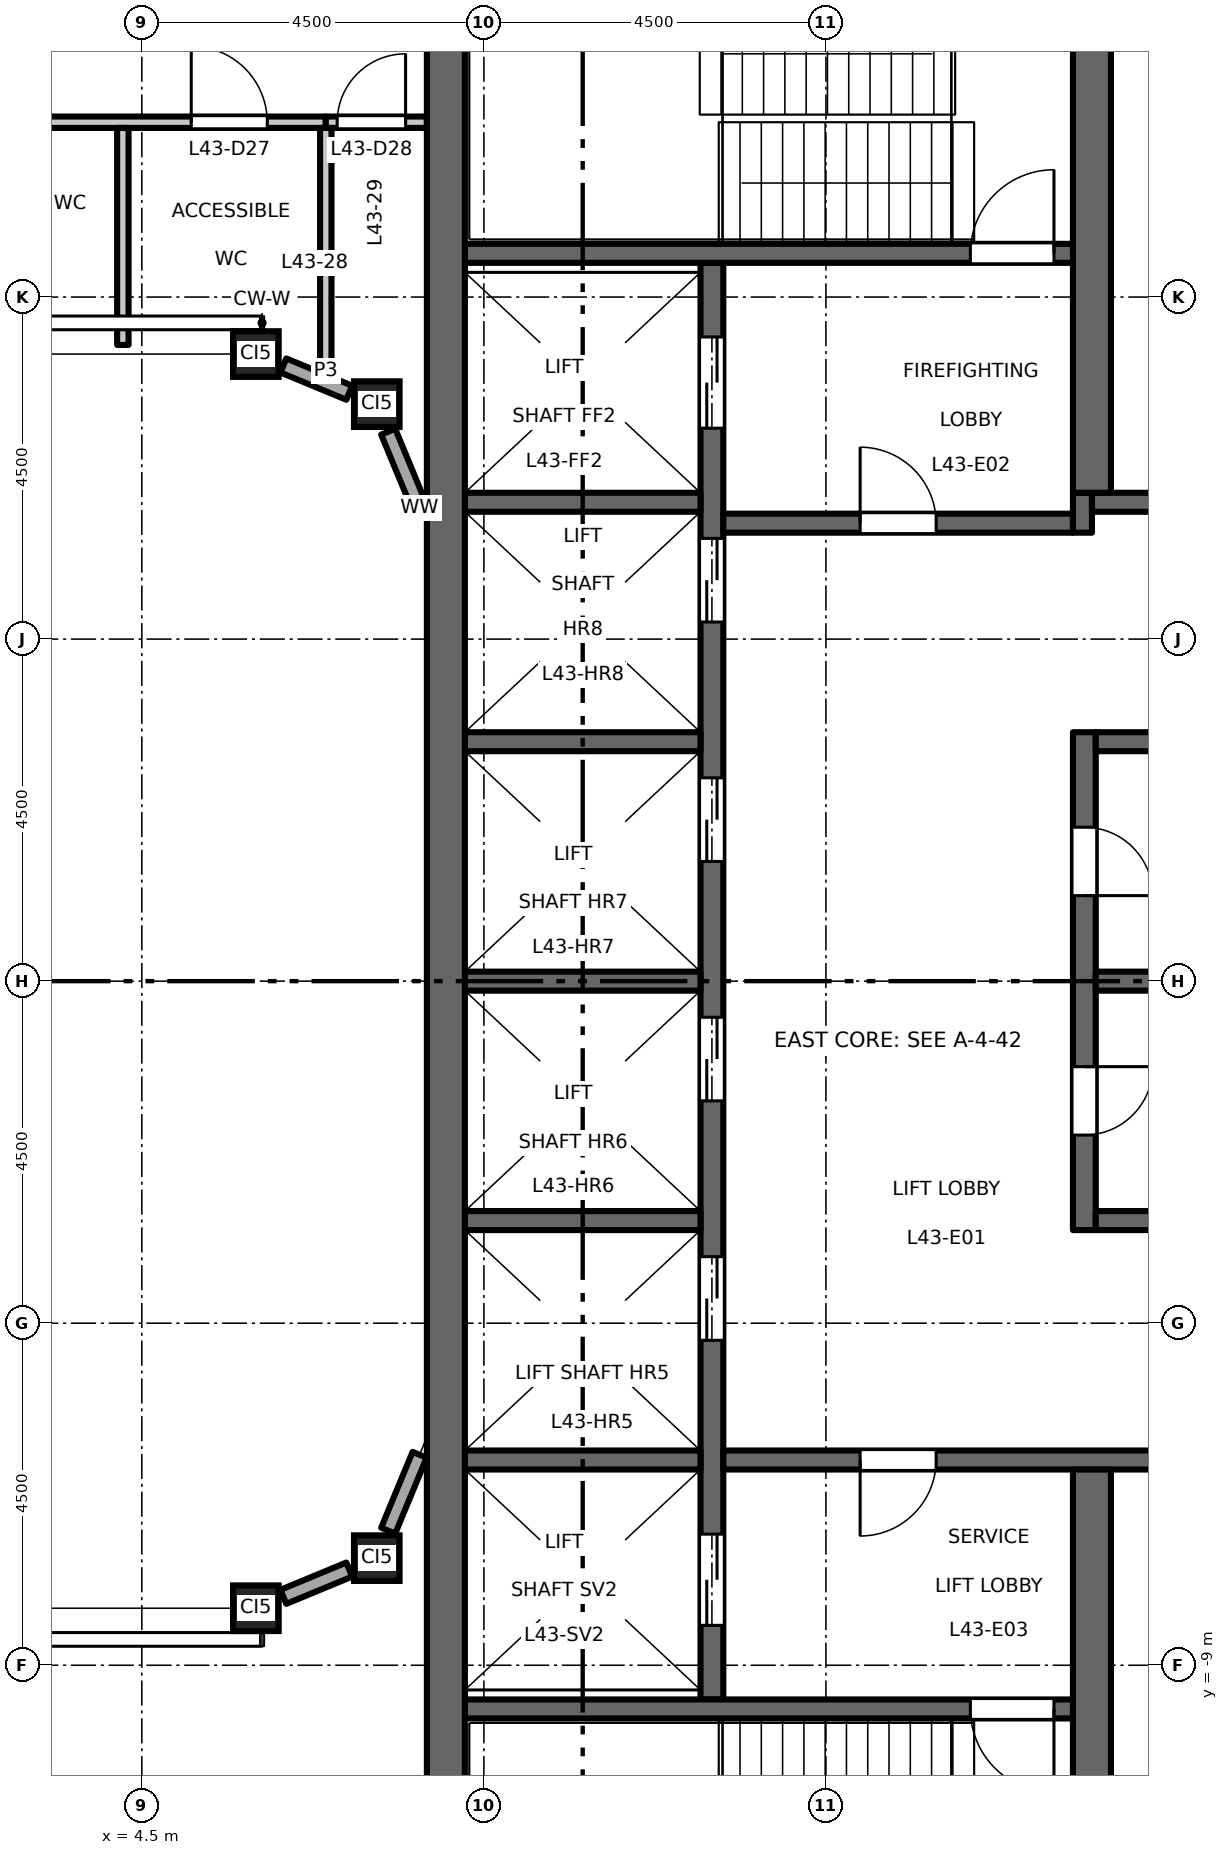
"""IFC4 building model, lengths in metres.
Left out: names, types, materials, properties, quantities, classifications, styles, units other than length and angle.
Written with IfcOpenShell. Run it as: python <this file> out.ifc"""

import sys

from ifc_helpers import new_model, si_unit, direction, frame, frame_2d, origin, origin_2d, place, context, subcontext, project, spatial, rectangle, hollow_rectangle, extrude, element, fill, save


model = new_model("IFC4")
c1 = context("Model", 3, precision=1e-05, world=origin(), true_north=direction((0.0, 1.0)))
c2 = subcontext(c1, "Body", "Model", "MODEL_VIEW")
j1 = project(units=[si_unit("LENGTHUNIT", "METRE"), si_unit("PLANEANGLEUNIT", "RADIAN")], contexts=[c1])
p1 = place(None, origin())
s1 = spatial("IfcSite", under=j1, at=p1, CompositionType="ELEMENT")
p2 = place(p1, origin())
s2 = spatial("IfcBuilding", under=s1, at=p2, CompositionType="ELEMENT")
p3 = place(p2, frame((0.0, 0.0, 201.7)))
s3 = spatial("IfcBuildingStorey", under=s2, at=p3, CompositionType="ELEMENT", Elevation=201.7)
for number, where, z_axis, x_axis in (
    (1, (6.0, -8.25, 0.0), (0.0, 0.0, 1.0), (1.0, 0.0, 0.0)),
    (2, (7.591, -7.591, 0.0), (0.0, 0.0, 1.0), (1.0, 0.0, 0.0)),
    (3, (6.0, 8.25, 0.0), (0.0, 0.0, 1.0), (1.0, 0.0, 0.0)),
    (4, (7.591, 7.591, 0.0), (0.0, 0.0, 1.0), (1.0, 0.0, 0.0)),
):
    element("IfcColumn", number, at=place(p3, frame(where, z_axis=z_axis, x_axis=x_axis)), inside=s3, PredefinedType="COLUMN", context=c2, shape_type="SweptSolid", body=[
        extrude(hollow_rectangle(XDim=0.6, YDim=0.6, WallThickness=0.032, at=origin_2d()), origin(), (0.0, 0.0, 1.0), 4.5),
    ])
p4 = place(p3, frame((12.0, -9.45, 0.0), z_axis=(0.0, 0.0, 1.0), x_axis=(0.0, 1.0, 0.0)))
e5 = element("IfcWall", 5, at=p4, inside=s3, PredefinedType="SHEAR", context=c2, shape_type="SweptSolid", body=[
    extrude(rectangle(XDim=18.9, YDim=0.3, at=frame_2d((9.45, 0.0))), origin(), (0.0, 0.0, 1.0), 4.35),
])
p5 = place(p4, frame((4.725, 0.0, 0.0)))
e6 = element("IfcOpeningElement", 6, at=p5, cuts=e5, PredefinedType="OPENING", context=c2, shape_type="SweptSolid", body=[
    extrude(rectangle(XDim=1.1, YDim=2.1, at=frame_2d((0.55, 1.05))), frame((0.0, 0.16, 0.0), z_axis=(0.0, -1.0, 0.0), x_axis=(1.0, 0.0, 0.0)), (0.0, 0.0, 1.0), 0.32),
])
p6 = place(p4, frame((7.875, 0.0, 0.0)))
e7 = element("IfcOpeningElement", 7, at=p6, cuts=e5, PredefinedType="OPENING", context=c2, shape_type="SweptSolid", body=[
    extrude(rectangle(XDim=1.1, YDim=2.1, at=frame_2d((0.55, 1.05))), frame((0.0, 0.16, 0.0), z_axis=(0.0, -1.0, 0.0), x_axis=(1.0, 0.0, 0.0)), (0.0, 0.0, 1.0), 0.32),
])
p7 = place(p4, frame((11.025, 0.0, 0.0)))
e8 = element("IfcOpeningElement", 8, at=p7, cuts=e5, PredefinedType="OPENING", context=c2, shape_type="SweptSolid", body=[
    extrude(rectangle(XDim=1.1, YDim=2.1, at=frame_2d((0.55, 1.05))), frame((0.0, 0.16, 0.0), z_axis=(0.0, -1.0, 0.0), x_axis=(1.0, 0.0, 0.0)), (0.0, 0.0, 1.0), 0.32),
])
p8 = place(p4, frame((14.175, 0.0, 0.0)))
e9 = element("IfcOpeningElement", 9, at=p8, cuts=e5, PredefinedType="OPENING", context=c2, shape_type="SweptSolid", body=[
    extrude(rectangle(XDim=1.1, YDim=2.1, at=frame_2d((0.55, 1.05))), frame((0.0, 0.16, 0.0), z_axis=(0.0, -1.0, 0.0), x_axis=(1.0, 0.0, 0.0)), (0.0, 0.0, 1.0), 0.32),
])
p9 = place(p4, frame((16.725, 0.0, 0.0)))
e10 = element("IfcOpeningElement", 10, at=p9, cuts=e5, PredefinedType="OPENING", context=c2, shape_type="SweptSolid", body=[
    extrude(rectangle(XDim=1.2, YDim=2.1, at=frame_2d((0.6, 1.05))), frame((0.0, 0.16, 0.0), z_axis=(0.0, -1.0, 0.0), x_axis=(1.0, 0.0, 0.0)), (0.0, 0.0, 1.0), 0.32),
])
p10 = place(p4, frame((0.975, 0.0, 0.0)))
e11 = element("IfcOpeningElement", 11, at=p10, cuts=e5, PredefinedType="OPENING", context=c2, shape_type="SweptSolid", body=[
    extrude(rectangle(XDim=1.2, YDim=2.1, at=frame_2d((0.6, 1.05))), frame((0.0, 0.16, 0.0), z_axis=(0.0, -1.0, 0.0), x_axis=(1.0, 0.0, 0.0)), (0.0, 0.0, 1.0), 0.32),
])
p11 = place(p3, frame((12.15, 6.025, 0.0), z_axis=(0.0, 0.0, 1.0), x_axis=(1.0, 0.0, 0.0)))
e12 = element("IfcWall", 12, at=p11, inside=s3, PredefinedType="SHEAR", context=c2, shape_type="SweptSolid", body=[
    extrude(rectangle(XDim=4.6, YDim=0.25, at=frame_2d((2.3, 0.0))), origin(), (0.0, 0.0, 1.0), 4.35),
])
p12 = place(p11, frame((1.8, 0.0, 0.0)))
e13 = element("IfcOpeningElement", 13, at=p12, cuts=e12, PredefinedType="OPENING", context=c2, shape_type="SweptSolid", body=[
    extrude(rectangle(XDim=1.0, YDim=2.1, at=frame_2d((0.5, 1.05))), frame((0.0, 0.135, 0.0), z_axis=(0.0, -1.0, 0.0), x_axis=(1.0, 0.0, 0.0)), (0.0, 0.0, 1.0), 0.27),
])
p13 = place(p3, frame((16.875, 5.9, 0.0), z_axis=(0.0, 0.0, 1.0), x_axis=(0.0, 1.0, 0.0)))
e14 = element("IfcWall", 14, at=p13, inside=s3, PredefinedType="SHEAR", context=c2, shape_type="SweptSolid", body=[
    extrude(rectangle(XDim=0.525, YDim=0.25, at=frame_2d((0.263, 0.0))), origin(), (0.0, 0.0, 1.0), 4.35),
])
p14 = place(p3, frame((17.0, 6.3, 0.0), z_axis=(0.0, 0.0, 1.0), x_axis=(1.0, 0.0, 0.0)))
e15 = element("IfcWall", 15, at=p14, inside=s3, PredefinedType="SHEAR", context=c2, shape_type="SweptSolid", body=[
    extrude(rectangle(XDim=4.25, YDim=0.25, at=frame_2d((2.125, 0.0))), origin(), (0.0, 0.0, 1.0), 4.35),
])
p15 = place(p3, frame((12.15, -6.3, 0.0), z_axis=(0.0, 0.0, 1.0), x_axis=(1.0, 0.0, 0.0)))
e16 = element("IfcWall", 16, at=p15, inside=s3, PredefinedType="SHEAR", context=c2, shape_type="SweptSolid", body=[
    extrude(rectangle(XDim=9.1, YDim=0.25, at=frame_2d((4.55, 0.0))), origin(), (0.0, 0.0, 1.0), 4.35),
])
p16 = place(p15, frame((1.8, 0.0, 0.0)))
e17 = element("IfcOpeningElement", 17, at=p16, cuts=e16, PredefinedType="OPENING", context=c2, shape_type="SweptSolid", body=[
    extrude(rectangle(XDim=1.0, YDim=2.1, at=frame_2d((0.5, 1.05))), frame((0.0, 0.135, 0.0), z_axis=(0.0, -1.0, 0.0), x_axis=(1.0, 0.0, 0.0)), (0.0, 0.0, 1.0), 0.27),
])
p17 = place(p3, frame((16.9, -3.275, 0.0), z_axis=(0.0, 0.0, 1.0), x_axis=(0.0, 1.0, 0.0)))
e18 = element("IfcWall", 18, at=p17, inside=s3, PredefinedType="SHEAR", context=c2, shape_type="SweptSolid", body=[
    extrude(rectangle(XDim=6.55, YDim=0.3, at=frame_2d((3.275, 0.0))), origin(), (0.0, 0.0, 1.0), 4.35),
])
p18 = place(p17, frame((1.25, 0.0, 0.0)))
e19 = element("IfcOpeningElement", 19, at=p18, cuts=e18, PredefinedType="OPENING", context=c2, shape_type="SweptSolid", body=[
    extrude(rectangle(XDim=0.9, YDim=2.1, at=frame_2d((0.45, 1.05))), frame((0.0, 0.16, 0.0), z_axis=(0.0, -1.0, 0.0), x_axis=(1.0, 0.0, 0.0)), (0.0, 0.0, 1.0), 0.32),
])
p19 = place(p17, frame((4.4, 0.0, 0.0)))
e20 = element("IfcOpeningElement", 20, at=p19, cuts=e18, PredefinedType="OPENING", context=c2, shape_type="SweptSolid", body=[
    extrude(rectangle(XDim=0.9, YDim=2.1, at=frame_2d((0.45, 1.05))), frame((0.0, 0.16, 0.0), z_axis=(0.0, -1.0, 0.0), x_axis=(1.0, 0.0, 0.0)), (0.0, 0.0, 1.0), 0.32),
])
for number, where, z_axis, x_axis in (
    (21, (17.05, 0.0, 0.0), (0.0, 0.0, 1.0), (1.0, 0.0, 0.0)),
    (22, (17.05, 3.15, 0.0), (0.0, 0.0, 1.0), (1.0, 0.0, 0.0)),
    (23, (17.05, -3.15, 0.0), (0.0, 0.0, 1.0), (1.0, 0.0, 0.0)),
):
    element("IfcWall", number, at=place(p3, frame(where, z_axis=z_axis, x_axis=x_axis)), inside=s3, PredefinedType="SHEAR", context=c2, shape_type="SweptSolid", body=[
        extrude(rectangle(XDim=4.2, YDim=0.25, at=frame_2d((2.1, 0.0))), origin(), (0.0, 0.0, 1.0), 4.35),
    ])
for number, where, z_axis, x_axis in (
    (24, (17.0, 6.425, 0.0), (0.0, 0.0, 1.0), (0.0, 1.0, 0.0)),
    (25, (17.0, -13.0, 0.0), (0.0, 0.0, 1.0), (0.0, 1.0, 0.0)),
):
    element("IfcWall", number, at=place(p3, frame(where, z_axis=z_axis, x_axis=x_axis)), inside=s3, PredefinedType="SHEAR", context=c2, shape_type="SweptSolid", body=[
        extrude(rectangle(XDim=6.575, YDim=0.5, at=frame_2d((3.288, 0.0))), origin(), (0.0, 0.0, 1.0), 4.35),
    ])
for number, where, z_axis, x_axis in (
    (26, (8.75, 0.0, 0.0), (0.0, 0.0, 1.0), (1.0, 0.0, 0.0)),
    (27, (8.75, 3.15, 0.0), (0.0, 0.0, 1.0), (1.0, 0.0, 0.0)),
    (28, (8.75, 6.3, 0.0), (0.0, 0.0, 1.0), (1.0, 0.0, 0.0)),
    (29, (8.75, -3.15, 0.0), (0.0, 0.0, 1.0), (1.0, 0.0, 0.0)),
    (30, (8.75, -6.3, 0.0), (0.0, 0.0, 1.0), (1.0, 0.0, 0.0)),
):
    element("IfcWall", number, at=place(p3, frame(where, z_axis=z_axis, x_axis=x_axis)), inside=s3, PredefinedType="SHEAR", context=c2, shape_type="SweptSolid", body=[
        extrude(rectangle(XDim=3.1, YDim=0.25, at=frame_2d((1.55, 0.0))), origin(), (0.0, 0.0, 1.0), 4.35),
    ])
p20 = place(p3, frame((8.75, 9.575, 0.0), z_axis=(0.0, 0.0, 1.0), x_axis=(1.0, 0.0, 0.0)))
e31 = element("IfcWall", 31, at=p20, inside=s3, PredefinedType="SHEAR", context=c2, shape_type="SweptSolid", body=[
    extrude(rectangle(XDim=8.0, YDim=0.25, at=frame_2d((4.0, 0.0))), origin(), (0.0, 0.0, 1.0), 4.35),
])
p21 = place(p20, frame((6.65, 0.0, 0.0)))
e32 = element("IfcOpeningElement", 32, at=p21, cuts=e31, PredefinedType="OPENING", context=c2, shape_type="SweptSolid", body=[
    extrude(rectangle(XDim=1.1, YDim=2.1, at=frame_2d((0.55, 1.05))), frame((0.0, 0.135, 0.0), z_axis=(0.0, -1.0, 0.0), x_axis=(1.0, 0.0, 0.0)), (0.0, 0.0, 1.0), 0.27),
])
p22 = place(p3, frame((8.75, -9.575, 0.0), z_axis=(0.0, 0.0, 1.0), x_axis=(1.0, 0.0, 0.0)))
e33 = element("IfcWall", 33, at=p22, inside=s3, PredefinedType="SHEAR", context=c2, shape_type="SweptSolid", body=[
    extrude(rectangle(XDim=8.0, YDim=0.25, at=frame_2d((4.0, 0.0))), origin(), (0.0, 0.0, 1.0), 4.35),
])
p23 = place(p22, frame((6.65, 0.0, 0.0)))
e34 = element("IfcOpeningElement", 34, at=p23, cuts=e33, PredefinedType="OPENING", context=c2, shape_type="SweptSolid", body=[
    extrude(rectangle(XDim=1.1, YDim=2.1, at=frame_2d((0.55, 1.05))), frame((0.0, 0.135, 0.0), z_axis=(0.0, -1.0, 0.0), x_axis=(1.0, 0.0, 0.0)), (0.0, 0.0, 1.0), 0.27),
])
p24 = place(p3, frame((8.5, -13.0, 0.0), z_axis=(0.0, 0.0, 1.0), x_axis=(0.0, 1.0, 0.0)))
e35 = element("IfcWall", 35, at=p24, inside=s3, PredefinedType="SHEAR", context=c2, shape_type="SweptSolid", body=[
    extrude(rectangle(XDim=26.0, YDim=0.5, at=frame_2d((13.0, 0.0))), origin(), (0.0, 0.0, 1.0), 4.35),
])
p25 = place(p3, frame((6.362, -8.1, 0.0), z_axis=(0.0, 0.0, 1.0), x_axis=(0.923829670615, 0.382803787458, 0.0)))
e36 = element("IfcWall", 36, at=p25, inside=s3, PredefinedType="STANDARD", context=c2, shape_type="SweptSolid", body=[
    extrude(rectangle(XDim=0.938, YDim=0.2, at=frame_2d((0.469, 0.0))), origin(), (0.0, 0.0, 1.0), 3.918),
])
for number, where, z_axis, x_axis in (
    (37, (7.741, -7.229, 0.0), (0.0, 0.0, 1.0), (0.383, 0.924, 0.0)),
    (38, (8.154, 6.231, 0.0), (0.0, 0.0, 1.0), (-0.383, 0.924, 0.0)),
):
    element("IfcWall", number, at=place(p3, frame(where, z_axis=z_axis, x_axis=x_axis)), inside=s3, PredefinedType="STANDARD", context=c2, shape_type="SweptSolid", body=[
        extrude(rectangle(XDim=1.08, YDim=0.2, at=frame_2d((0.54, 0.0))), origin(), (0.0, 0.0, 1.0), 3.918),
    ])
p26 = place(p3, frame((7.229, 7.741, 0.0), z_axis=(0.0, 0.0, 1.0), x_axis=(-0.923829670615, 0.382803787458, 0.0)))
e39 = element("IfcWall", 39, at=p26, inside=s3, PredefinedType="STANDARD", context=c2, shape_type="SweptSolid", body=[
    extrude(rectangle(XDim=0.938, YDim=0.2, at=frame_2d((0.469, 0.0))), origin(), (0.0, 0.0, 1.0), 3.918),
])
p27 = place(p3, frame((-8.25, 11.3, 0.0), z_axis=(0.0, 0.0, 1.0), x_axis=(1.0, 0.0, 0.0)))
e40 = element("IfcWall", 40, at=p27, inside=s3, PredefinedType="PARTITIONING", context=c2, shape_type="SweptSolid", body=[
    extrude(rectangle(XDim=15.17, YDim=0.15, at=frame_2d((7.585, 0.0))), origin(), (0.0, 0.0, 1.0), 4.35),
])
p28 = place(p27, frame((2.65, 0.0, 0.0)))
e41 = element("IfcOpeningElement", 41, at=p28, cuts=e40, PredefinedType="OPENING", context=c2, shape_type="SweptSolid", body=[
    extrude(rectangle(XDim=1.0, YDim=2.1, at=frame_2d((0.5, 1.05))), frame((0.0, 0.085, 0.0), z_axis=(0.0, -1.0, 0.0), x_axis=(1.0, 0.0, 0.0)), (0.0, 0.0, 1.0), 0.17),
])
p29 = place(p27, frame((8.9, 0.0, 0.0)))
e42 = element("IfcOpeningElement", 42, at=p29, cuts=e40, PredefinedType="OPENING", context=c2, shape_type="SweptSolid", body=[
    extrude(rectangle(XDim=1.0, YDim=2.1, at=frame_2d((0.5, 1.05))), frame((0.0, 0.085, 0.0), z_axis=(0.0, -1.0, 0.0), x_axis=(1.0, 0.0, 0.0)), (0.0, 0.0, 1.0), 0.17),
])
p30 = place(p27, frame((13.4, 0.0, 0.0)))
e43 = element("IfcOpeningElement", 43, at=p30, cuts=e40, PredefinedType="OPENING", context=c2, shape_type="SweptSolid", body=[
    extrude(rectangle(XDim=1.0, YDim=2.1, at=frame_2d((0.5, 1.05))), frame((0.0, 0.085, 0.0), z_axis=(0.0, -1.0, 0.0), x_axis=(1.0, 0.0, 0.0)), (0.0, 0.0, 1.0), 0.17),
])
p31 = place(p3, frame((6.92, 11.3, 0.0), z_axis=(0.0, 0.0, 1.0), x_axis=(1.0, 0.0, 0.0)))
e44 = element("IfcWall", 44, at=p31, inside=s3, PredefinedType="PARTITIONING", context=c2, shape_type="SweptSolid", body=[
    extrude(rectangle(XDim=1.33, YDim=0.15, at=frame_2d((0.665, 0.0))), origin(), (0.0, 0.0, 1.0), 4.35),
])
p32 = place(p31, frame((0.15, 0.0, 0.0)))
e45 = element("IfcOpeningElement", 45, at=p32, cuts=e44, PredefinedType="OPENING", context=c2, shape_type="SweptSolid", body=[
    extrude(rectangle(XDim=0.9, YDim=2.1, at=frame_2d((0.45, 1.05))), frame((0.0, 0.085, 0.0), z_axis=(0.0, -1.0, 0.0), x_axis=(1.0, 0.0, 0.0)), (0.0, 0.0, 1.0), 0.17),
])
p33 = place(p3, frame((4.25, 8.37, 0.0), z_axis=(0.0, 0.0, 1.0), x_axis=(0.0, 1.0, 0.0)))
e46 = element("IfcWall", 46, at=p33, inside=s3, PredefinedType="PARTITIONING", context=c2, shape_type="SweptSolid", body=[
    extrude(rectangle(XDim=2.855, YDim=0.15, at=frame_2d((1.427, 0.0))), origin(), (0.0, 0.0, 1.0), 4.35),
])
p34 = place(p3, frame((6.92, 8.029, 0.0), z_axis=(0.0, 0.0, 1.0), x_axis=(0.0, 1.0, 0.0)))
e47 = element("IfcWall", 47, at=p34, inside=s3, PredefinedType="PARTITIONING", context=c2, shape_type="SweptSolid", body=[
    extrude(rectangle(XDim=3.196, YDim=0.15, at=frame_2d((1.598, 0.0))), origin(), (0.0, 0.0, 1.0), 4.35),
])
p35 = place(p12, origin())
e48 = element("IfcDoor", 48, at=p35, inside=s3, OperationType="SINGLE_SWING_RIGHT", PredefinedType="DOOR", context=c2, shape_type="SweptSolid", body=[
    extrude(rectangle(XDim=1.0, YDim=2.1, at=frame_2d((0.5, 1.05))), frame((0.0, 0.025, 0.0), z_axis=(0.0, -1.0, 0.0), x_axis=(1.0, 0.0, 0.0)), (0.0, 0.0, 1.0), 0.05),
])
fill(e13, e48)
p36 = place(p16, origin())
e49 = element("IfcDoor", 49, at=p36, inside=s3, OperationType="SINGLE_SWING_LEFT", PredefinedType="DOOR", context=c2, shape_type="SweptSolid", body=[
    extrude(rectangle(XDim=1.0, YDim=2.1, at=frame_2d((0.5, 1.05))), frame((0.0, 0.025, 0.0), z_axis=(0.0, -1.0, 0.0), x_axis=(1.0, 0.0, 0.0)), (0.0, 0.0, 1.0), 0.05),
])
fill(e17, e49)
p37 = place(p21, origin())
e50 = element("IfcDoor", 50, at=p37, inside=s3, OperationType="SINGLE_SWING_LEFT", PredefinedType="DOOR", context=c2, shape_type="SweptSolid", body=[
    extrude(rectangle(XDim=1.1, YDim=2.1, at=frame_2d((0.55, 1.05))), frame((0.0, 0.025, 0.0), z_axis=(0.0, -1.0, 0.0), x_axis=(1.0, 0.0, 0.0)), (0.0, 0.0, 1.0), 0.05),
])
fill(e32, e50)
p38 = place(p23, origin())
e51 = element("IfcDoor", 51, at=p38, inside=s3, OperationType="SINGLE_SWING_RIGHT", PredefinedType="DOOR", context=c2, shape_type="SweptSolid", body=[
    extrude(rectangle(XDim=1.1, YDim=2.1, at=frame_2d((0.55, 1.05))), frame((0.0, 0.025, 0.0), z_axis=(0.0, -1.0, 0.0), x_axis=(1.0, 0.0, 0.0)), (0.0, 0.0, 1.0), 0.05),
])
fill(e34, e51)
p39 = place(p5, origin())
e52 = element("IfcDoor", 52, at=p39, inside=s3, OperationType="DOUBLE_DOOR_SLIDING", PredefinedType="DOOR", context=c2, shape_type="SweptSolid", body=[
    extrude(rectangle(XDim=1.1, YDim=2.1, at=frame_2d((0.55, 1.05))), frame((0.0, 0.025, 0.0), z_axis=(0.0, -1.0, 0.0), x_axis=(1.0, 0.0, 0.0)), (0.0, 0.0, 1.0), 0.05),
])
fill(e6, e52)
p40 = place(p6, origin())
e53 = element("IfcDoor", 53, at=p40, inside=s3, OperationType="DOUBLE_DOOR_SLIDING", PredefinedType="DOOR", context=c2, shape_type="SweptSolid", body=[
    extrude(rectangle(XDim=1.1, YDim=2.1, at=frame_2d((0.55, 1.05))), frame((0.0, 0.025, 0.0), z_axis=(0.0, -1.0, 0.0), x_axis=(1.0, 0.0, 0.0)), (0.0, 0.0, 1.0), 0.05),
])
fill(e7, e53)
p41 = place(p7, origin())
e54 = element("IfcDoor", 54, at=p41, inside=s3, OperationType="DOUBLE_DOOR_SLIDING", PredefinedType="DOOR", context=c2, shape_type="SweptSolid", body=[
    extrude(rectangle(XDim=1.1, YDim=2.1, at=frame_2d((0.55, 1.05))), frame((0.0, 0.025, 0.0), z_axis=(0.0, -1.0, 0.0), x_axis=(1.0, 0.0, 0.0)), (0.0, 0.0, 1.0), 0.05),
])
fill(e8, e54)
p42 = place(p8, origin())
e55 = element("IfcDoor", 55, at=p42, inside=s3, OperationType="DOUBLE_DOOR_SLIDING", PredefinedType="DOOR", context=c2, shape_type="SweptSolid", body=[
    extrude(rectangle(XDim=1.1, YDim=2.1, at=frame_2d((0.55, 1.05))), frame((0.0, 0.025, 0.0), z_axis=(0.0, -1.0, 0.0), x_axis=(1.0, 0.0, 0.0)), (0.0, 0.0, 1.0), 0.05),
])
fill(e9, e55)
p43 = place(p9, origin())
e56 = element("IfcDoor", 56, at=p43, inside=s3, OperationType="DOUBLE_DOOR_SLIDING", PredefinedType="DOOR", context=c2, shape_type="SweptSolid", body=[
    extrude(rectangle(XDim=1.2, YDim=2.1, at=frame_2d((0.6, 1.05))), frame((0.0, 0.025, 0.0), z_axis=(0.0, -1.0, 0.0), x_axis=(1.0, 0.0, 0.0)), (0.0, 0.0, 1.0), 0.05),
])
fill(e10, e56)
p44 = place(p10, origin())
e57 = element("IfcDoor", 57, at=p44, inside=s3, OperationType="DOUBLE_DOOR_SLIDING", PredefinedType="DOOR", context=c2, shape_type="SweptSolid", body=[
    extrude(rectangle(XDim=1.2, YDim=2.1, at=frame_2d((0.6, 1.05))), frame((0.0, 0.025, 0.0), z_axis=(0.0, -1.0, 0.0), x_axis=(1.0, 0.0, 0.0)), (0.0, 0.0, 1.0), 0.05),
])
fill(e11, e57)
p45 = place(p18, origin())
e58 = element("IfcDoor", 58, at=p45, inside=s3, OperationType="SINGLE_SWING_RIGHT", PredefinedType="DOOR", context=c2, shape_type="SweptSolid", body=[
    extrude(rectangle(XDim=0.9, YDim=2.1, at=frame_2d((0.45, 1.05))), frame((0.0, 0.025, 0.0), z_axis=(0.0, -1.0, 0.0), x_axis=(1.0, 0.0, 0.0)), (0.0, 0.0, 1.0), 0.05),
])
fill(e19, e58)
p46 = place(p19, origin())
e59 = element("IfcDoor", 59, at=p46, inside=s3, OperationType="SINGLE_SWING_LEFT", PredefinedType="DOOR", context=c2, shape_type="SweptSolid", body=[
    extrude(rectangle(XDim=0.9, YDim=2.1, at=frame_2d((0.45, 1.05))), frame((0.0, 0.025, 0.0), z_axis=(0.0, -1.0, 0.0), x_axis=(1.0, 0.0, 0.0)), (0.0, 0.0, 1.0), 0.05),
])
fill(e20, e59)
p47 = place(p30, origin())
e60 = element("IfcDoor", 60, at=p47, inside=s3, OperationType="SINGLE_SWING_LEFT", PredefinedType="DOOR", context=c2, shape_type="SweptSolid", body=[
    extrude(rectangle(XDim=1.0, YDim=2.1, at=frame_2d((0.5, 1.05))), frame((0.0, 0.025, 0.0), z_axis=(0.0, -1.0, 0.0), x_axis=(1.0, 0.0, 0.0)), (0.0, 0.0, 1.0), 0.05),
])
fill(e43, e60)
p48 = place(p32, origin())
e61 = element("IfcDoor", 61, at=p48, inside=s3, OperationType="SINGLE_SWING_RIGHT", PredefinedType="DOOR", context=c2, shape_type="SweptSolid", body=[
    extrude(rectangle(XDim=0.9, YDim=2.1, at=frame_2d((0.45, 1.05))), frame((0.0, 0.025, 0.0), z_axis=(0.0, -1.0, 0.0), x_axis=(1.0, 0.0, 0.0)), (0.0, 0.0, 1.0), 0.05),
])
fill(e45, e61)
save(model, sys.argv[1])
